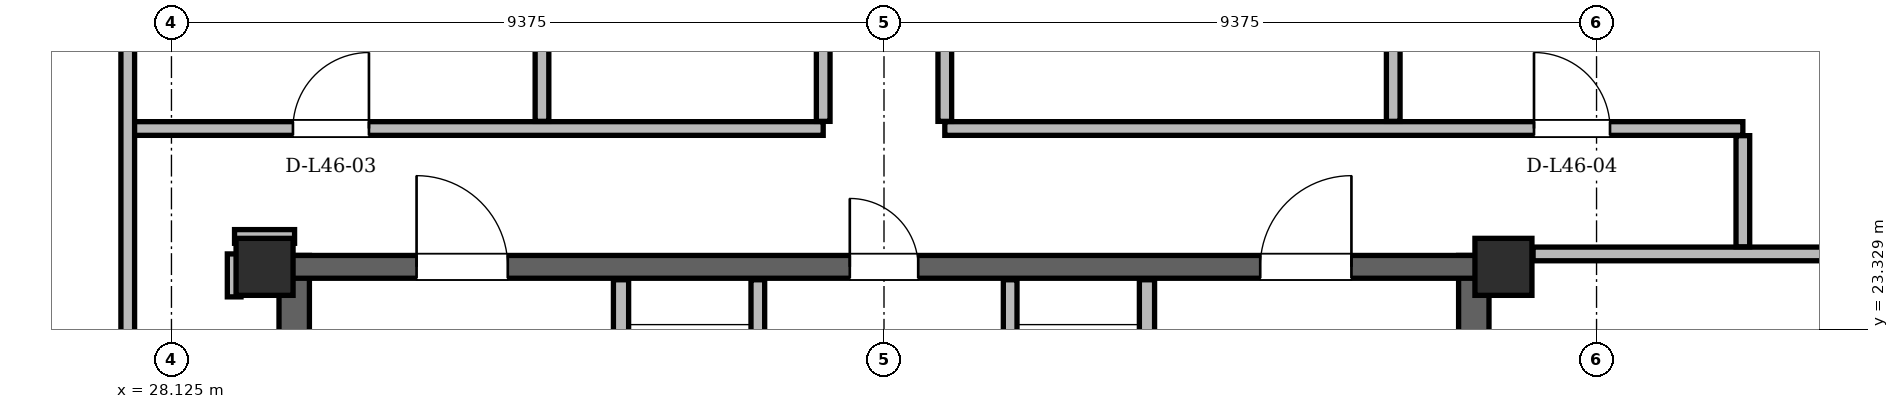
"""IFC4 building model, lengths in metres.
Left out: names, types, materials, properties, quantities, classifications, styles, units other than length and angle.
Written with IfcOpenShell. Run it as: python <this file> out.ifc"""

import sys

from ifc_helpers import new_model, si_unit, direction, frame, frame_2d, origin, origin_2d, place, context, subcontext, project, spatial, rectangle, hollow_rectangle, extrude, element, fill, save


model = new_model("IFC4")
c1 = context("Model", 3, precision=1e-05, world=origin(), true_north=direction((0.0, 1.0)))
c2 = subcontext(c1, "Body", "Model", "MODEL_VIEW")
j1 = project(units=[si_unit("LENGTHUNIT", "METRE"), si_unit("PLANEANGLEUNIT", "RADIAN")], contexts=[c1])
p1 = place(None, origin())
s1 = spatial("IfcSite", under=j1, at=p1, CompositionType="ELEMENT")
p2 = place(p1, origin())
s2 = spatial("IfcBuilding", under=s1, at=p2, CompositionType="ELEMENT")
p3 = place(p2, frame((0.0, 0.0, 174.6)))
s3 = spatial("IfcBuildingStorey", under=s2, at=p3, CompositionType="ELEMENT", Elevation=174.6)
for number, where, z_axis, x_axis in (
    (1, (45.65, 24.15, 0.0), (0.0, 0.0, 1.0), (1.0, 0.0, 0.0)),
    (2, (29.35, 24.15, 0.0), (0.0, 0.0, 1.0), (1.0, 0.0, 0.0)),
):
    element("IfcColumn", number, at=place(p3, frame(where, z_axis=z_axis, x_axis=x_axis)), inside=s3, PredefinedType="COLUMN", context=c2, shape_type="SweptSolid", body=[
        extrude(hollow_rectangle(XDim=0.75, YDim=0.75, WallThickness=0.06, at=origin_2d()), origin(), (0.0, 0.0, 1.0), 3.6),
    ])
for number, where, z_axis, x_axis in (
    (3, (29.74, 11.0, 0.0), (0.0, 0.0, 1.0), (0.0, 1.0, 0.0)),
    (4, (45.26, 11.0, 0.0), (0.0, 0.0, 1.0), (0.0, 1.0, 0.0)),
):
    element("IfcWall", number, at=place(p3, frame(where, z_axis=z_axis, x_axis=x_axis)), inside=s3, PredefinedType="SHEAR", context=c2, shape_type="SweptSolid", body=[
        extrude(rectangle(XDim=13.3, YDim=0.4, at=frame_2d((6.65, 0.0))), origin(), (0.0, 0.0, 1.0), 3.38),
    ])
p4 = place(p3, frame((29.65, 24.15, 0.0), z_axis=(0.0, 0.0, 1.0), x_axis=(1.0, 0.0, 0.0)))
e5 = element("IfcWall", 5, at=p4, inside=s3, PredefinedType="SHEAR", context=c2, shape_type="SweptSolid", body=[
    extrude(rectangle(XDim=15.7, YDim=0.3, at=frame_2d((7.85, 0.0))), origin(), (0.0, 0.0, 1.0), 3.38),
])
p5 = place(p4, frame((1.7, 0.0, 0.0)))
e6 = element("IfcOpeningElement", 6, at=p5, cuts=e5, PredefinedType="OPENING", context=c2, shape_type="SweptSolid", body=[
    extrude(rectangle(XDim=1.2, YDim=2.2, at=frame_2d((0.6, 1.1))), frame((0.0, 0.15, 0.0), z_axis=(0.0, -1.0, 0.0), x_axis=(1.0, 0.0, 0.0)), (0.0, 0.0, 1.0), 0.3),
])
p6 = place(p4, frame((12.8, 0.0, 0.0)))
e7 = element("IfcOpeningElement", 7, at=p6, cuts=e5, PredefinedType="OPENING", context=c2, shape_type="SweptSolid", body=[
    extrude(rectangle(XDim=1.2, YDim=2.2, at=frame_2d((0.6, 1.1))), frame((0.0, 0.15, 0.0), z_axis=(0.0, -1.0, 0.0), x_axis=(1.0, 0.0, 0.0)), (0.0, 0.0, 1.0), 0.3),
])
p7 = place(p4, frame((7.4, 0.0, 0.0)))
e8 = element("IfcOpeningElement", 8, at=p7, cuts=e5, PredefinedType="OPENING", context=c2, shape_type="SweptSolid", body=[
    extrude(rectangle(XDim=0.9, YDim=2.05, at=frame_2d((0.45, 1.025))), frame((0.0, 0.15, 0.0), z_axis=(0.0, -1.0, 0.0), x_axis=(1.0, 0.0, 0.0)), (0.0, 0.0, 1.0), 0.3),
])
p8 = place(p3, frame((59.66, 12.15, 0.0), z_axis=(0.0, 0.0, 1.0), x_axis=(-0.499997724503, 0.866026717539, 0.0)))
e9 = element("IfcWall", 9, at=p8, inside=s3, PredefinedType="SOLIDWALL", context=c2, shape_type="SweptSolid", body=[
    extrude(rectangle(XDim=35.93, YDim=0.29, at=frame_2d((17.965, 0.0))), origin(), (0.0, 0.0, 1.0), 2.6),
])
p9 = place(p8, frame((6.579, 0.0, 0.0)))
e10 = element("IfcOpeningElement", 10, at=p9, cuts=e9, PredefinedType="OPENING", context=c2, shape_type="SweptSolid", body=[
    extrude(rectangle(XDim=1.5, YDim=2.2, at=frame_2d((0.75, 1.1))), frame((0.0, 0.145, 0.0), z_axis=(0.0, -1.0, 0.0), x_axis=(1.0, 0.0, 0.0)), (0.0, 0.0, 1.0), 0.29),
])
p10 = place(p8, frame((27.235, 0.0, 0.0)))
e11 = element("IfcOpeningElement", 11, at=p10, cuts=e9, PredefinedType="OPENING", context=c2, shape_type="SweptSolid", body=[
    extrude(rectangle(XDim=1.5, YDim=2.2, at=frame_2d((0.75, 1.1))), frame((0.0, 0.145, 0.0), z_axis=(0.0, -1.0, 0.0), x_axis=(1.0, 0.0, 0.0)), (0.0, 0.0, 1.0), 0.29),
])
p11 = place(p8, frame((33.046, 0.0, 0.85)))
e12 = element("IfcOpeningElement", 12, at=p11, cuts=e9, PredefinedType="OPENING", context=c2, shape_type="SweptSolid", body=[
    extrude(rectangle(XDim=1.2, YDim=1.48, at=frame_2d((0.6, 0.74))), frame((0.0, 0.145, 0.0), z_axis=(0.0, -1.0, 0.0), x_axis=(1.0, 0.0, 0.0)), (0.0, 0.0, 1.0), 0.29),
])
p12 = place(p8, frame((15.958, 0.0, 0.85)))
e13 = element("IfcOpeningElement", 13, at=p12, cuts=e9, PredefinedType="OPENING", context=c2, shape_type="SweptSolid", body=[
    extrude(rectangle(XDim=1.4, YDim=1.6, at=frame_2d((0.7, 0.8))), frame((0.0, 0.145, 0.0), z_axis=(0.0, -1.0, 0.0), x_axis=(1.0, 0.0, 0.0)), (0.0, 0.0, 1.0), 0.29),
])
p13 = place(p8, frame((21.417, 0.0, 0.85)))
e14 = element("IfcOpeningElement", 14, at=p13, cuts=e9, PredefinedType="OPENING", context=c2, shape_type="SweptSolid", body=[
    extrude(rectangle(XDim=2.5, YDim=1.64, at=frame_2d((1.25, 0.82))), frame((0.0, 0.145, 0.0), z_axis=(0.0, -1.0, 0.0), x_axis=(1.0, 0.0, 0.0)), (0.0, 0.0, 1.0), 0.29),
])
p14 = place(p3, frame((33.305, 43.266, 0.0), z_axis=(0.0, 0.0, 1.0), x_axis=(-0.499997724503, -0.866026717539, 0.0)))
e15 = element("IfcWall", 15, at=p14, inside=s3, PredefinedType="SOLIDWALL", context=c2, shape_type="SweptSolid", body=[
    extrude(rectangle(XDim=35.93, YDim=0.29, at=frame_2d((17.965, 0.0))), origin(), (0.0, 0.0, 1.0), 2.6),
])
p15 = place(p14, frame((3.429, 0.0, 0.0)))
e16 = element("IfcOpeningElement", 16, at=p15, cuts=e15, PredefinedType="OPENING", context=c2, shape_type="SweptSolid", body=[
    extrude(rectangle(XDim=1.5, YDim=2.2, at=frame_2d((0.75, 1.1))), frame((0.0, 0.145, 0.0), z_axis=(0.0, -1.0, 0.0), x_axis=(1.0, 0.0, 0.0)), (0.0, 0.0, 1.0), 0.29),
])
p16 = place(p14, frame((26.395, 0.0, 0.0)))
e17 = element("IfcOpeningElement", 17, at=p16, cuts=e15, PredefinedType="OPENING", context=c2, shape_type="SweptSolid", body=[
    extrude(rectangle(XDim=1.5, YDim=2.2, at=frame_2d((0.75, 1.1))), frame((0.0, 0.145, 0.0), z_axis=(0.0, -1.0, 0.0), x_axis=(1.0, 0.0, 0.0)), (0.0, 0.0, 1.0), 0.29),
])
p17 = place(p14, frame((33.871, 0.0, 0.85)))
e18 = element("IfcOpeningElement", 18, at=p17, cuts=e15, PredefinedType="OPENING", context=c2, shape_type="SweptSolid", body=[
    extrude(rectangle(XDim=1.2, YDim=1.48, at=frame_2d((0.6, 0.74))), frame((0.0, 0.145, 0.0), z_axis=(0.0, -1.0, 0.0), x_axis=(1.0, 0.0, 0.0)), (0.0, 0.0, 1.0), 0.29),
])
p18 = place(p14, frame((18.111, 0.0, 0.85)))
e19 = element("IfcOpeningElement", 19, at=p18, cuts=e15, PredefinedType="OPENING", context=c2, shape_type="SweptSolid", body=[
    extrude(rectangle(XDim=2.6, YDim=1.64, at=frame_2d((1.3, 0.82))), frame((0.0, 0.145, 0.0), z_axis=(0.0, -1.0, 0.0), x_axis=(1.0, 0.0, 0.0)), (0.0, 0.0, 1.0), 0.29),
])
p19 = place(p14, frame((28.176, 0.0, 0.85)))
e20 = element("IfcOpeningElement", 20, at=p19, cuts=e15, PredefinedType="OPENING", context=c2, shape_type="SweptSolid", body=[
    extrude(rectangle(XDim=1.2, YDim=1.48, at=frame_2d((0.6, 0.74))), frame((0.0, 0.145, 0.0), z_axis=(0.0, -1.0, 0.0), x_axis=(1.0, 0.0, 0.0)), (0.0, 0.0, 1.0), 0.29),
])
p20 = place(p14, frame((12.519, 0.0, 0.85)))
e21 = element("IfcOpeningElement", 21, at=p20, cuts=e15, PredefinedType="OPENING", context=c2, shape_type="SweptSolid", body=[
    extrude(rectangle(XDim=1.2, YDim=1.48, at=frame_2d((0.6, 0.74))), frame((0.0, 0.145, 0.0), z_axis=(0.0, -1.0, 0.0), x_axis=(1.0, 0.0, 0.0)), (0.0, 0.0, 1.0), 0.29),
])
p21 = place(p14, frame((14.808, 0.0, 0.85)))
e22 = element("IfcOpeningElement", 22, at=p21, cuts=e15, PredefinedType="OPENING", context=c2, shape_type="SweptSolid", body=[
    extrude(rectangle(XDim=1.8, YDim=1.64, at=frame_2d((0.9, 0.82))), frame((0.0, 0.145, 0.0), z_axis=(0.0, -1.0, 0.0), x_axis=(1.0, 0.0, 0.0)), (0.0, 0.0, 1.0), 0.29),
])
p22 = place(p14, frame((8.735, 0.0, 0.85)))
e23 = element("IfcOpeningElement", 23, at=p22, cuts=e15, PredefinedType="OPENING", context=c2, shape_type="SweptSolid", body=[
    extrude(rectangle(XDim=1.2, YDim=1.48, at=frame_2d((0.6, 0.74))), frame((0.0, 0.145, 0.0), z_axis=(0.0, -1.0, 0.0), x_axis=(1.0, 0.0, 0.0)), (0.0, 0.0, 1.0), 0.29),
])
p23 = place(p14, frame((6.749, 0.0, 0.85)))
e24 = element("IfcOpeningElement", 24, at=p23, cuts=e15, PredefinedType="OPENING", context=c2, shape_type="SweptSolid", body=[
    extrude(rectangle(XDim=1.2, YDim=1.48, at=frame_2d((0.6, 0.74))), frame((0.0, 0.145, 0.0), z_axis=(0.0, -1.0, 0.0), x_axis=(1.0, 0.0, 0.0)), (0.0, 0.0, 1.0), 0.29),
])
p24 = place(p14, frame((1.837, 0.0, 0.85)))
e25 = element("IfcOpeningElement", 25, at=p24, cuts=e15, PredefinedType="OPENING", context=c2, shape_type="SweptSolid", body=[
    extrude(rectangle(XDim=1.2, YDim=1.48, at=frame_2d((0.6, 0.74))), frame((0.0, 0.145, 0.0), z_axis=(0.0, -1.0, 0.0), x_axis=(1.0, 0.0, 0.0)), (0.0, 0.0, 1.0), 0.29),
])
p25 = place(p3, frame((34.04, 19.48, 0.0), z_axis=(0.0, 0.0, 1.0), x_axis=(0.0, 1.0, 0.0)))
e26 = element("IfcWall", 26, at=p25, inside=s3, PredefinedType="PARTITIONING", context=c2, shape_type="SweptSolid", body=[
    extrude(rectangle(XDim=4.5, YDim=0.2, at=frame_2d((2.25, 0.0))), origin(), (0.0, 0.0, 1.0), 3.38),
])
p26 = place(p25, frame((2.12, 0.0, 0.0)))
e27 = element("IfcOpeningElement", 27, at=p26, cuts=e26, PredefinedType="OPENING", context=c2, shape_type="SweptSolid", body=[
    extrude(rectangle(XDim=1.1, YDim=2.2, at=frame_2d((0.55, 1.1))), frame((0.0, 0.1, 0.0), z_axis=(0.0, -1.0, 0.0), x_axis=(1.0, 0.0, 0.0)), (0.0, 0.0, 1.0), 0.2),
])
p27 = place(p3, frame((35.84, 20.96, 0.0), z_axis=(0.0, 0.0, 1.0), x_axis=(0.0, 1.0, 0.0)))
e28 = element("IfcWall", 28, at=p27, inside=s3, PredefinedType="PARTITIONING", context=c2, shape_type="SweptSolid", body=[
    extrude(rectangle(XDim=3.02, YDim=0.18, at=frame_2d((1.51, 0.0))), origin(), (0.0, 0.0, 1.0), 3.38),
])
p28 = place(p3, frame((40.96, 19.48, 0.0), z_axis=(0.0, 0.0, 1.0), x_axis=(0.0, 1.0, 0.0)))
e29 = element("IfcWall", 29, at=p28, inside=s3, PredefinedType="PARTITIONING", context=c2, shape_type="SweptSolid", body=[
    extrude(rectangle(XDim=4.5, YDim=0.2, at=frame_2d((2.25, 0.0))), origin(), (0.0, 0.0, 1.0), 3.38),
])
p29 = place(p28, frame((2.12, 0.0, 0.0)))
e30 = element("IfcOpeningElement", 30, at=p29, cuts=e29, PredefinedType="OPENING", context=c2, shape_type="SweptSolid", body=[
    extrude(rectangle(XDim=1.1, YDim=2.2, at=frame_2d((0.55, 1.1))), frame((0.0, 0.1, 0.0), z_axis=(0.0, -1.0, 0.0), x_axis=(1.0, 0.0, 0.0)), (0.0, 0.0, 1.0), 0.2),
])
p30 = place(p3, frame((39.16, 20.96, 0.0), z_axis=(0.0, 0.0, 1.0), x_axis=(0.0, 1.0, 0.0)))
e31 = element("IfcWall", 31, at=p30, inside=s3, PredefinedType="PARTITIONING", context=c2, shape_type="SweptSolid", body=[
    extrude(rectangle(XDim=3.02, YDim=0.18, at=frame_2d((1.51, 0.0))), origin(), (0.0, 0.0, 1.0), 3.38),
])
p31 = place(p3, frame((46.04, 24.32, 0.0), z_axis=(0.0, 0.0, 1.0), x_axis=(1.0, 0.0, 0.0)))
e32 = element("IfcWall", 32, at=p31, inside=s3, PredefinedType="PARTITIONING", context=c2, shape_type="SweptSolid", body=[
    extrude(rectangle(XDim=6.421, YDim=0.18, at=frame_2d((3.211, 0.0))), origin(), (0.0, 0.0, 1.0), 3.38),
])
p32 = place(p3, frame((28.955, 24.55, 0.0), z_axis=(0.0, 0.0, 1.0), x_axis=(1.0, 0.0, 0.0)))
e33 = element("IfcWall", 33, at=p32, inside=s3, PredefinedType="PARTITIONING", context=c2, shape_type="SweptSolid", body=[
    extrude(rectangle(XDim=0.79, YDim=0.18, at=frame_2d((0.395, 0.0))), origin(), (0.0, 0.0, 1.0), 2.842),
])
p33 = place(p3, frame((27.55, 25.97, 0.0), z_axis=(0.0, 0.0, 1.0), x_axis=(1.0, 0.0, 0.0)))
e34 = element("IfcWall", 34, at=p33, inside=s3, PredefinedType="PARTITIONING", context=c2, shape_type="SweptSolid", body=[
    extrude(rectangle(XDim=9.15, YDim=0.18, at=frame_2d((4.575, 0.0))), origin(), (0.0, 0.0, 1.0), 2.842),
])
p34 = place(p33, frame((2.173, 0.0, 0.0)))
e35 = element("IfcOpeningElement", 35, at=p34, cuts=e34, PredefinedType="OPENING", context=c2, shape_type="SweptSolid", body=[
    extrude(rectangle(XDim=1.0, YDim=2.18, at=frame_2d((0.5, 1.09))), frame((0.0, 0.09, 0.0), z_axis=(0.0, -1.0, 0.0), x_axis=(1.0, 0.0, 0.0)), (0.0, 0.0, 1.0), 0.18),
])
p35 = place(p3, frame((38.3, 25.97, 0.0), z_axis=(0.0, 0.0, 1.0), x_axis=(1.0, 0.0, 0.0)))
e36 = element("IfcWall", 36, at=p35, inside=s3, PredefinedType="PARTITIONING", context=c2, shape_type="SweptSolid", body=[
    extrude(rectangle(XDim=10.5, YDim=0.18, at=frame_2d((5.25, 0.0))), origin(), (0.0, 0.0, 1.0), 2.842),
])
p36 = place(p35, frame((7.752, 0.0, 0.0)))
e37 = element("IfcOpeningElement", 37, at=p36, cuts=e36, PredefinedType="OPENING", context=c2, shape_type="SweptSolid", body=[
    extrude(rectangle(XDim=1.0, YDim=2.18, at=frame_2d((0.5, 1.09))), frame((0.0, 0.09, 0.0), z_axis=(0.0, -1.0, 0.0), x_axis=(1.0, 0.0, 0.0)), (0.0, 0.0, 1.0), 0.18),
])
p37 = place(p3, frame((27.55, 18.544, 0.0), z_axis=(0.0, 0.0, 1.0), x_axis=(0.0, 1.0, 0.0)))
e38 = element("IfcWall", 38, at=p37, inside=s3, PredefinedType="PARTITIONING", context=c2, shape_type="SweptSolid", body=[
    extrude(rectangle(XDim=14.456, YDim=0.18, at=frame_2d((7.228, 0.0))), origin(), (0.0, 0.0, 1.0), 3.38),
])
p38 = place(p37, frame((2.267, 0.0, 0.0)))
e39 = element("IfcOpeningElement", 39, at=p38, cuts=e38, PredefinedType="OPENING", context=c2, shape_type="SweptSolid", body=[
    extrude(rectangle(XDim=1.0, YDim=2.18, at=frame_2d((0.5, 1.09))), frame((0.0, 0.09, 0.0), z_axis=(0.0, -1.0, 0.0), x_axis=(1.0, 0.0, 0.0)), (0.0, 0.0, 1.0), 0.18),
])
p39 = place(p3, frame((28.95, 23.755, 0.0), z_axis=(0.0, 0.0, 1.0), x_axis=(0.0, 1.0, 0.0)))
e40 = element("IfcWall", 40, at=p39, inside=s3, PredefinedType="PARTITIONING", context=c2, shape_type="SweptSolid", body=[
    extrude(rectangle(XDim=0.565, YDim=0.18, at=frame_2d((0.283, 0.0))), origin(), (0.0, 0.0, 1.0), 3.38),
])
p40 = place(p3, frame((33.0, 26.064, 0.0), z_axis=(0.0, 0.0, 1.0), x_axis=(0.0, 1.0, 0.0)))
e41 = element("IfcWall", 41, at=p40, inside=s3, PredefinedType="PARTITIONING", context=c2, shape_type="SweptSolid", body=[
    extrude(rectangle(XDim=16.376, YDim=0.18, at=frame_2d((8.188, 0.0))), origin(), (0.0, 0.0, 1.0), 2.842),
])
p41 = place(p3, frame((36.7, 26.064, 0.0), z_axis=(0.0, 0.0, 1.0), x_axis=(0.0, 1.0, 0.0)))
e42 = element("IfcWall", 42, at=p41, inside=s3, PredefinedType="PARTITIONING", context=c2, shape_type="SweptSolid", body=[
    extrude(rectangle(XDim=17.053, YDim=0.18, at=frame_2d((8.526, 0.0))), origin(), (0.0, 0.0, 1.0), 3.38),
])
p42 = place(p41, frame((4.9, 0.0, 0.0)))
e43 = element("IfcOpeningElement", 43, at=p42, cuts=e42, PredefinedType="OPENING", context=c2, shape_type="SweptSolid", body=[
    extrude(rectangle(XDim=1.0, YDim=2.18, at=frame_2d((0.5, 1.09))), frame((0.0, 0.09, 0.0), z_axis=(0.0, -1.0, 0.0), x_axis=(1.0, 0.0, 0.0)), (0.0, 0.0, 1.0), 0.18),
])
p43 = place(p3, frame((38.3, 26.064, 0.0), z_axis=(0.0, 0.0, 1.0), x_axis=(0.0, 1.0, 0.0)))
e44 = element("IfcWall", 44, at=p43, inside=s3, PredefinedType="PARTITIONING", context=c2, shape_type="SweptSolid", body=[
    extrude(rectangle(XDim=6.042, YDim=0.18, at=frame_2d((3.021, 0.0))), origin(), (0.0, 0.0, 1.0), 3.38),
])
p44 = place(p43, frame((4.454, 0.0, 0.0)))
e45 = element("IfcOpeningElement", 45, at=p44, cuts=e44, PredefinedType="OPENING", context=c2, shape_type="SweptSolid", body=[
    extrude(rectangle(XDim=1.0, YDim=2.18, at=frame_2d((0.5, 1.09))), frame((0.0, 0.09, 0.0), z_axis=(0.0, -1.0, 0.0), x_axis=(1.0, 0.0, 0.0)), (0.0, 0.0, 1.0), 0.18),
])
p45 = place(p3, frame((44.2, 26.064, 0.0), z_axis=(0.0, 0.0, 1.0), x_axis=(0.0, 1.0, 0.0)))
e46 = element("IfcWall", 46, at=p45, inside=s3, PredefinedType="PARTITIONING", context=c2, shape_type="SweptSolid", body=[
    extrude(rectangle(XDim=12.565, YDim=0.18, at=frame_2d((6.283, 0.0))), origin(), (0.0, 0.0, 1.0), 2.842),
])
p46 = place(p3, frame((48.8, 24.414, 0.0), z_axis=(0.0, 0.0, 1.0), x_axis=(0.0, 1.0, 0.0)))
e47 = element("IfcWall", 47, at=p46, inside=s3, PredefinedType="PARTITIONING", context=c2, shape_type="SweptSolid", body=[
    extrude(rectangle(XDim=1.462, YDim=0.18, at=frame_2d((0.731, 0.0))), origin(), (0.0, 0.0, 1.0), 3.38),
])
p47 = place(p5, origin())
e48 = element("IfcDoor", 48, at=p47, inside=s3, OperationType="SINGLE_SWING_LEFT", PredefinedType="DOOR", context=c2, shape_type="SweptSolid", body=[
    extrude(rectangle(XDim=1.2, YDim=2.2, at=frame_2d((0.6, 1.1))), frame((0.0, 0.025, 0.0), z_axis=(0.0, -1.0, 0.0), x_axis=(1.0, 0.0, 0.0)), (0.0, 0.0, 1.0), 0.05),
])
fill(e6, e48)
p48 = place(p6, origin())
e49 = element("IfcDoor", 49, at=p48, inside=s3, OperationType="SINGLE_SWING_RIGHT", PredefinedType="DOOR", context=c2, shape_type="SweptSolid", body=[
    extrude(rectangle(XDim=1.2, YDim=2.2, at=frame_2d((0.6, 1.1))), frame((0.0, 0.025, 0.0), z_axis=(0.0, -1.0, 0.0), x_axis=(1.0, 0.0, 0.0)), (0.0, 0.0, 1.0), 0.05),
])
fill(e7, e49)
p49 = place(p7, origin())
e50 = element("IfcDoor", 50, at=p49, inside=s3, OperationType="SINGLE_SWING_LEFT", PredefinedType="DOOR", context=c2, shape_type="SweptSolid", body=[
    extrude(rectangle(XDim=0.9, YDim=2.05, at=frame_2d((0.45, 1.025))), frame((0.0, 0.025, 0.0), z_axis=(0.0, -1.0, 0.0), x_axis=(1.0, 0.0, 0.0)), (0.0, 0.0, 1.0), 0.05),
])
fill(e8, e50)
p50 = place(p34, origin())
e51 = element("IfcDoor", 51, at=p50, inside=s3, OperationType="SINGLE_SWING_RIGHT", PredefinedType="DOOR", context=c2, shape_type="SweptSolid", body=[
    extrude(rectangle(XDim=1.0, YDim=2.18, at=frame_2d((0.5, 1.09))), frame((0.0, 0.025, 0.0), z_axis=(0.0, -1.0, 0.0), x_axis=(1.0, 0.0, 0.0)), (0.0, 0.0, 1.0), 0.05),
])
fill(e35, e51)
p51 = place(p36, origin())
e52 = element("IfcDoor", 52, at=p51, inside=s3, OperationType="SINGLE_SWING_LEFT", PredefinedType="DOOR", context=c2, shape_type="SweptSolid", body=[
    extrude(rectangle(XDim=1.0, YDim=2.18, at=frame_2d((0.5, 1.09))), frame((0.0, 0.025, 0.0), z_axis=(0.0, -1.0, 0.0), x_axis=(1.0, 0.0, 0.0)), (0.0, 0.0, 1.0), 0.05),
])
fill(e37, e52)
save(model, sys.argv[1])
